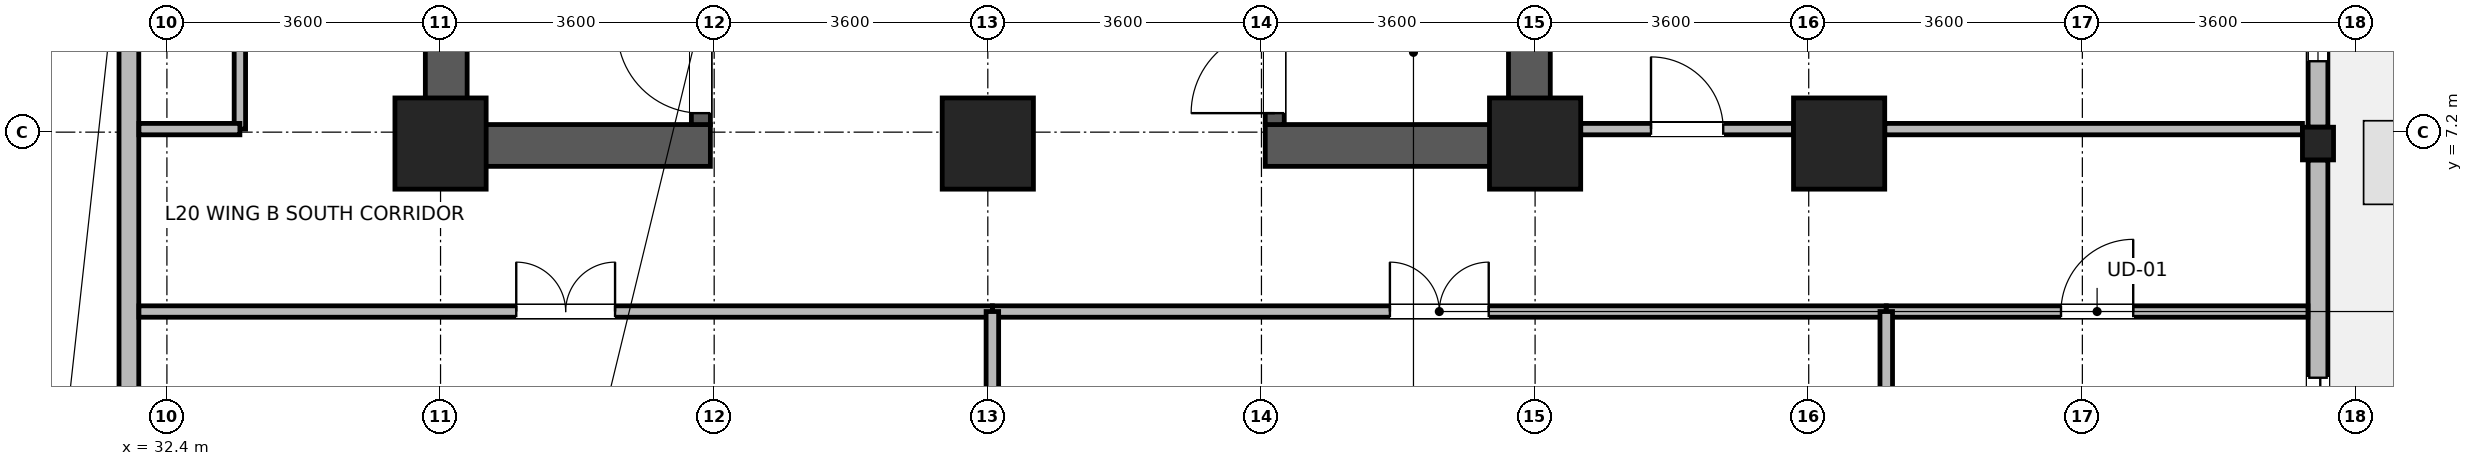
"""IFC4 building model, lengths in metres.
Left out: names, types, materials, properties, quantities, classifications, styles, units other than length and angle.
Written with IfcOpenShell. Run it as: python <this file> out.ifc"""

import sys

from ifc_helpers import new_model, si_unit, direction, frame, frame_2d, origin, origin_2d, place, context, subcontext, project, spatial, rectangle, i_section, extrude, source, transform, mapped, element, fill, save


model = new_model("IFC4")
c1 = context("Model", 3, precision=1e-05, world=origin(), true_north=direction((0.0, 1.0)))
c2 = subcontext(c1, "Body", "Model", "MODEL_VIEW")
j1 = project(units=[si_unit("LENGTHUNIT", "METRE"), si_unit("PLANEANGLEUNIT", "RADIAN")], contexts=[c1])
p1 = place(None, origin())
s1 = spatial("IfcSite", under=j1, at=p1, CompositionType="ELEMENT")
p2 = place(p1, origin())
s2 = spatial("IfcBuilding", under=s1, at=p2, CompositionType="ELEMENT")
p3 = place(p2, frame((0.0, 0.0, 82.3)))
s3 = spatial("IfcBuildingStorey", under=s2, at=p3, CompositionType="ELEMENT", Elevation=82.3)
for number, where, z_axis, x_axis in (
    (1, (36.075, 6.75, 0.0), (0.0, 0.0, 1.0), (0.0, 1.0, 0.0)),
    (2, (50.325, 6.75, 0.0), (0.0, 0.0, 1.0), (0.0, 1.0, 0.0)),
):
    element("IfcWall", number, at=place(p3, frame(where, z_axis=z_axis, x_axis=x_axis)), inside=s3, PredefinedType="SHEAR", context=c2, shape_type="SweptSolid", body=[
        extrude(rectangle(XDim=8.1, YDim=0.55, at=frame_2d((4.05, 0.0))), origin(), (0.0, 0.0, 1.0), 3.45),
    ])
for number, where, z_axis, x_axis in (
    (3, (36.35, 7.025, 0.0), (0.0, 0.0, 1.0), (1.0, 0.0, 0.0)),
    (4, (46.85, 7.025, 0.0), (0.0, 0.0, 1.0), (1.0, 0.0, 0.0)),
):
    element("IfcWall", number, at=place(p3, frame(where, z_axis=z_axis, x_axis=x_axis)), inside=s3, PredefinedType="SHEAR", context=c2, shape_type="SweptSolid", body=[
        extrude(rectangle(XDim=3.2, YDim=0.55, at=frame_2d((1.6, 0.0))), origin(), (0.0, 0.0, 1.0), 3.45),
    ])
p4 = place(p3, frame((39.425, 7.3, 0.0), z_axis=(0.0, 0.0, 1.0), x_axis=(0.0, 1.0, 0.0)))
e5 = element("IfcWall", 5, at=p4, inside=s3, PredefinedType="SHEAR", context=c2, shape_type="SweptSolid", body=[
    extrude(rectangle(XDim=7.0, YDim=0.25, at=frame_2d((3.5, 0.0))), origin(), (0.0, 0.0, 1.0), 3.45),
])
p5 = place(p4, frame((0.15, 0.0, 0.0)))
e6 = element("IfcOpeningElement", 6, at=p5, cuts=e5, PredefinedType="OPENING", context=c2, shape_type="SweptSolid", body=[
    extrude(rectangle(XDim=1.1, YDim=2.08, at=frame_2d((0.55, 1.04))), frame((0.0, 0.135, 0.0), z_axis=(0.0, -1.0, 0.0), x_axis=(1.0, 0.0, 0.0)), (0.0, 0.0, 1.0), 0.27),
])
p6 = place(p3, frame((46.975, 7.3, 0.0), z_axis=(0.0, 0.0, 1.0), x_axis=(0.0, 1.0, 0.0)))
e7 = element("IfcWall", 7, at=p6, inside=s3, PredefinedType="SHEAR", context=c2, shape_type="SweptSolid", body=[
    extrude(rectangle(XDim=7.0, YDim=0.25, at=frame_2d((3.5, 0.0))), origin(), (0.0, 0.0, 1.0), 3.45),
])
p7 = place(p6, frame((0.15, 0.0, 0.0)))
e8 = element("IfcOpeningElement", 8, at=p7, cuts=e7, PredefinedType="OPENING", context=c2, shape_type="SweptSolid", body=[
    extrude(rectangle(XDim=1.1, YDim=2.08, at=frame_2d((0.55, 1.04))), frame((0.0, 0.135, 0.0), z_axis=(0.0, -1.0, 0.0), x_axis=(1.0, 0.0, 0.0)), (0.0, 0.0, 1.0), 0.27),
])
m1 = source(origin(), c2, "Body", "SweptSolid", [
    extrude(rectangle(XDim=1.2, YDim=1.2, at=origin_2d()), origin(), (0.0, 0.0, 1.0), 3.7),
])
for number, where, z_axis, x_axis in (
    (9, (36.0, 7.05, 0.0), (0.0, 0.0, 1.0), (1.0, 0.0, 0.0)),
    (10, (43.2, 7.05, 0.0), (0.0, 0.0, 1.0), (1.0, 0.0, 0.0)),
    (11, (50.4, 7.05, 0.0), (0.0, 0.0, 1.0), (1.0, 0.0, 0.0)),
    (12, (54.4, 7.05, 0.0), (0.0, 0.0, 1.0), (1.0, 0.0, 0.0)),
):
    element("IfcColumn", number, at=place(p3, frame(where, z_axis=z_axis, x_axis=x_axis)), inside=s3, PredefinedType="COLUMN", context=c2, shape_type="MappedRepresentation", body=[
        mapped(m1, transform((0.0, 0.0, 0.0), x_axis=(1.0, 0.0, 0.0), y_axis=(0.0, 1.0, 0.0), z_axis=(0.0, 0.0, 1.0), scale=1.0)),
    ])
m2 = source(origin(), c2, "Body", "SweptSolid", [
    extrude(i_section(OverallWidth=0.409, OverallDepth=0.43, WebThickness=0.024, FlangeThickness=0.033, FilletRadius=0.015, at=origin_2d()), origin(), (0.0, 0.0, 1.0), 3.7),
])
p8 = place(p3, frame((60.7, 7.05, 0.0), z_axis=(0.0, 0.0, 1.0), x_axis=(1.0, 0.0, 0.0)))
e13 = element("IfcColumn", 13, at=p8, inside=s3, PredefinedType="COLUMN", context=c2, shape_type="MappedRepresentation", body=[
    mapped(m2, transform((0.0, 0.0, 0.0), x_axis=(1.0, 0.0, 0.0), y_axis=(0.0, 1.0, 0.0), z_axis=(0.0, 0.0, 1.0), scale=1.0)),
])
p9 = place(p3, frame((60.7, 6.834, 0.0), z_axis=(0.0, 0.0, 1.0), x_axis=(0.0, -1.0, 0.0)))
e14 = element("IfcWall", 14, at=p9, inside=s3, PredefinedType="STANDARD", context=c2, shape_type="SweptSolid", body=[
    extrude(rectangle(XDim=5.164, YDim=0.26, at=frame_2d((2.582, 0.0))), origin(), (0.0, 0.0, 1.0), 3.43),
])
p10 = place(p9, frame((2.865, 0.0, 0.0)))
e15 = element("IfcOpeningElement", 15, at=p10, cuts=e14, PredefinedType="OPENING", context=c2, shape_type="SweptSolid", body=[
    extrude(rectangle(XDim=1.5, YDim=2.15, at=frame_2d((0.75, 1.075))), frame((0.0, 0.14, 0.0), z_axis=(0.0, -1.0, 0.0), x_axis=(1.0, 0.0, 0.0)), (0.0, 0.0, 1.0), 0.28),
])
p11 = place(p3, frame((60.7, 14.334, 0.0), z_axis=(0.0, 0.0, 1.0), x_axis=(0.0, -1.0, 0.0)))
e16 = element("IfcWall", 16, at=p11, inside=s3, PredefinedType="STANDARD", context=c2, shape_type="SweptSolid", body=[
    extrude(rectangle(XDim=7.068, YDim=0.26, at=frame_2d((3.534, 0.0))), origin(), (0.0, 0.0, 1.0), 2.93),
])
p12 = place(p11, frame((0.867, 0.0, 0.85)))
e17 = element("IfcOpeningElement", 17, at=p12, cuts=e16, PredefinedType="OPENING", context=c2, shape_type="SweptSolid", body=[
    extrude(rectangle(XDim=1.8, YDim=1.85, at=frame_2d((0.9, 0.925))), frame((0.0, 0.14, 0.0), z_axis=(0.0, -1.0, 0.0), x_axis=(1.0, 0.0, 0.0)), (0.0, 0.0, 1.0), 0.28),
])
p13 = place(p11, frame((4.401, 0.0, 0.85)))
e18 = element("IfcOpeningElement", 18, at=p13, cuts=e16, PredefinedType="OPENING", context=c2, shape_type="SweptSolid", body=[
    extrude(rectangle(XDim=1.8, YDim=1.85, at=frame_2d((0.9, 0.925))), frame((0.0, 0.14, 0.0), z_axis=(0.0, -1.0, 0.0), x_axis=(1.0, 0.0, 0.0)), (0.0, 0.0, 1.0), 0.28),
])
p14 = place(p3, frame((31.9, 1.67, 0.0), z_axis=(0.0, 0.0, 1.0), x_axis=(0.0, 1.0, 0.0)))
e19 = element("IfcWall", 19, at=p14, inside=s3, PredefinedType="STANDARD", context=c2, shape_type="SweptSolid", body=[
    extrude(rectangle(XDim=20.06, YDim=0.26, at=frame_2d((10.03, 0.0))), origin(), (0.0, 0.0, 1.0), 3.43),
])
p15 = place(p14, frame((7.008, 0.0, 0.85)))
e20 = element("IfcOpeningElement", 20, at=p15, cuts=e19, PredefinedType="OPENING", context=c2, shape_type="SweptSolid", body=[
    extrude(rectangle(XDim=2.7, YDim=2.05, at=frame_2d((1.35, 1.025))), frame((0.0, 0.14, 0.0), z_axis=(0.0, -1.0, 0.0), x_axis=(1.0, 0.0, 0.0)), (0.0, 0.0, 1.0), 0.28),
])
p16 = place(p14, frame((13.695, 0.0, 0.85)))
e21 = element("IfcOpeningElement", 21, at=p16, cuts=e19, PredefinedType="OPENING", context=c2, shape_type="SweptSolid", body=[
    extrude(rectangle(XDim=2.7, YDim=2.05, at=frame_2d((1.35, 1.025))), frame((0.0, 0.14, 0.0), z_axis=(0.0, -1.0, 0.0), x_axis=(1.0, 0.0, 0.0)), (0.0, 0.0, 1.0), 0.28),
])
p17 = place(p3, frame((43.26, 4.84, 0.0), z_axis=(0.0, 0.0, 1.0), x_axis=(1.0, 0.0, 0.0)))
e22 = element("IfcWall", 22, at=p17, inside=s3, PredefinedType="PARTITIONING", context=c2, shape_type="SweptSolid", body=[
    extrude(rectangle(XDim=11.76, YDim=0.15, at=frame_2d((5.88, 0.0))), origin(), (0.0, 0.0, 1.0), 3.43),
])
p18 = place(p17, frame((5.23, 0.0, 0.0)))
e23 = element("IfcOpeningElement", 23, at=p18, cuts=e22, PredefinedType="OPENING", context=c2, shape_type="SweptSolid", body=[
    extrude(rectangle(XDim=1.3, YDim=2.12, at=frame_2d((0.65, 1.06))), frame((0.0, 0.085, 0.0), z_axis=(0.0, -1.0, 0.0), x_axis=(1.0, 0.0, 0.0)), (0.0, 0.0, 1.0), 0.17),
])
p19 = place(p3, frame((32.032, 4.84, 0.0), z_axis=(0.0, 0.0, 1.0), x_axis=(1.0, 0.0, 0.0)))
e24 = element("IfcWall", 24, at=p19, inside=s3, PredefinedType="PARTITIONING", context=c2, shape_type="SweptSolid", body=[
    extrude(rectangle(XDim=11.228, YDim=0.15, at=frame_2d((5.614, 0.0))), origin(), (0.0, 0.0, 1.0), 3.43),
])
p20 = place(p19, frame((4.964, 0.0, 0.0)))
e25 = element("IfcOpeningElement", 25, at=p20, cuts=e24, PredefinedType="OPENING", context=c2, shape_type="SweptSolid", body=[
    extrude(rectangle(XDim=1.3, YDim=2.12, at=frame_2d((0.65, 1.06))), frame((0.0, 0.085, 0.0), z_axis=(0.0, -1.0, 0.0), x_axis=(1.0, 0.0, 0.0)), (0.0, 0.0, 1.0), 0.17),
])
p21 = place(p3, frame((51.0, 7.24, 0.0), z_axis=(0.0, 0.0, 1.0), x_axis=(1.0, 0.0, 0.0)))
e26 = element("IfcWall", 26, at=p21, inside=s3, PredefinedType="PARTITIONING", context=c2, shape_type="SweptSolid", body=[
    extrude(rectangle(XDim=2.8, YDim=0.15, at=frame_2d((1.4, 0.0))), origin(), (0.0, 0.0, 1.0), 2.78),
])
p22 = place(p21, frame((0.925, 0.0, 0.0)))
e27 = element("IfcOpeningElement", 27, at=p22, cuts=e26, PredefinedType="OPENING", context=c2, shape_type="SweptSolid", body=[
    extrude(rectangle(XDim=0.95, YDim=2.1, at=frame_2d((0.475, 1.05))), frame((0.0, 0.085, 0.0), z_axis=(0.0, -1.0, 0.0), x_axis=(1.0, 0.0, 0.0)), (0.0, 0.0, 1.0), 0.17),
])
p23 = place(p3, frame((55.0, 7.24, 0.0), z_axis=(0.0, 0.0, 1.0), x_axis=(1.0, 0.0, 0.0)))
e28 = element("IfcWall", 28, at=p23, inside=s3, PredefinedType="PARTITIONING", context=c2, shape_type="SweptSolid", body=[
    extrude(rectangle(XDim=5.496, YDim=0.15, at=frame_2d((2.748, 0.0))), origin(), (0.0, 0.0, 1.0), 2.78),
])
p24 = place(p3, frame((33.36, 7.24, 0.0), z_axis=(0.0, 0.0, 1.0), x_axis=(0.0, 1.0, 0.0)))
e29 = element("IfcWall", 29, at=p24, inside=s3, PredefinedType="PARTITIONING", context=c2, shape_type="SweptSolid", body=[
    extrude(rectangle(XDim=7.26, YDim=0.15, at=frame_2d((3.63, 0.0))), origin(), (0.0, 0.0, 1.0), 3.43),
])
p25 = place(p24, frame((2.98, 0.0, 0.0)))
e30 = element("IfcOpeningElement", 30, at=p25, cuts=e29, PredefinedType="OPENING", context=c2, shape_type="SweptSolid", body=[
    extrude(rectangle(XDim=1.3, YDim=2.12, at=frame_2d((0.65, 1.06))), frame((0.0, 0.085, 0.0), z_axis=(0.0, -1.0, 0.0), x_axis=(1.0, 0.0, 0.0)), (0.0, 0.0, 1.0), 0.17),
])
p26 = place(p3, frame((55.02, 4.84, 0.0), z_axis=(0.0, 0.0, 1.0), x_axis=(1.0, 0.0, 0.0)))
e31 = element("IfcWall", 31, at=p26, inside=s3, PredefinedType="PARTITIONING", context=c2, shape_type="SweptSolid", body=[
    extrude(rectangle(XDim=5.548, YDim=0.15, at=frame_2d((2.774, 0.0))), origin(), (0.0, 0.0, 1.0), 3.43),
])
p27 = place(p26, frame((2.299, 0.0, 0.0)))
e32 = element("IfcOpeningElement", 32, at=p27, cuts=e31, PredefinedType="OPENING", context=c2, shape_type="SweptSolid", body=[
    extrude(rectangle(XDim=0.95, YDim=2.1, at=frame_2d((0.475, 1.05))), frame((0.0, 0.085, 0.0), z_axis=(0.0, -1.0, 0.0), x_axis=(1.0, 0.0, 0.0)), (0.0, 0.0, 1.0), 0.17),
])
p28 = place(p3, frame((32.032, 7.24, 0.0), z_axis=(0.0, 0.0, 1.0), x_axis=(1.0, 0.0, 0.0)))
e33 = element("IfcWall", 33, at=p28, inside=s3, PredefinedType="PARTITIONING", context=c2, shape_type="SweptSolid", body=[
    extrude(rectangle(XDim=1.328, YDim=0.15, at=frame_2d((0.664, 0.0))), origin(), (0.0, 0.0, 1.0), 3.43),
])
for number, where, z_axis, x_axis in (
    (34, (43.26, 1.932, 0.0), (0.0, 0.0, 1.0), (0.0, 1.0, 0.0)),
    (35, (55.02, 1.932, 0.0), (0.0, 0.0, 1.0), (0.0, 1.0, 0.0)),
):
    element("IfcWall", number, at=place(p3, frame(where, z_axis=z_axis, x_axis=x_axis)), inside=s3, PredefinedType="PARTITIONING", context=c2, shape_type="SweptSolid", body=[
        extrude(rectangle(XDim=2.908, YDim=0.165, at=frame_2d((1.454, 0.0))), origin(), (0.0, 0.0, 1.0), 3.43),
    ])
p29 = place(p10, origin())
e36 = element("IfcDoor", 36, at=p29, inside=s3, OperationType="SLIDING_TO_LEFT", PredefinedType="DOOR", context=c2, shape_type="SweptSolid", body=[
    extrude(rectangle(XDim=1.5, YDim=2.15, at=frame_2d((0.75, 1.075))), frame((0.0, 0.025, 0.0), z_axis=(0.0, -1.0, 0.0), x_axis=(1.0, 0.0, 0.0)), (0.0, 0.0, 1.0), 0.05),
])
fill(e15, e36)
p30 = place(p13, origin())
e37 = element("IfcWindow", 37, at=p30, inside=s3, PartitioningType="SINGLE_PANEL", PredefinedType="WINDOW", context=c2, shape_type="SweptSolid", body=[
    extrude(rectangle(XDim=1.8, YDim=1.85, at=frame_2d((0.9, 0.925))), frame((0.0, 0.03, 0.0), z_axis=(0.0, -1.0, 0.0), x_axis=(1.0, 0.0, 0.0)), (0.0, 0.0, 1.0), 0.06),
])
fill(e18, e37)
p31 = place(p5, origin())
e38 = element("IfcDoor", 38, at=p31, inside=s3, OperationType="SINGLE_SWING_RIGHT", PredefinedType="DOOR", context=c2, shape_type="SweptSolid", body=[
    extrude(rectangle(XDim=1.1, YDim=2.08, at=frame_2d((0.55, 1.04))), frame((0.0, 0.025, 0.0), z_axis=(0.0, -1.0, 0.0), x_axis=(1.0, 0.0, 0.0)), (0.0, 0.0, 1.0), 0.05),
])
fill(e6, e38)
p32 = place(p7, origin())
e39 = element("IfcDoor", 39, at=p32, inside=s3, OperationType="SINGLE_SWING_LEFT", PredefinedType="DOOR", context=c2, shape_type="SweptSolid", body=[
    extrude(rectangle(XDim=1.1, YDim=2.08, at=frame_2d((0.55, 1.04))), frame((0.0, 0.025, 0.0), z_axis=(0.0, -1.0, 0.0), x_axis=(1.0, 0.0, 0.0)), (0.0, 0.0, 1.0), 0.05),
])
fill(e8, e39)
p33 = place(p18, origin())
e40 = element("IfcDoor", 40, at=p33, inside=s3, OperationType="DOUBLE_DOOR_SINGLE_SWING", PredefinedType="DOOR", context=c2, shape_type="SweptSolid", body=[
    extrude(rectangle(XDim=1.3, YDim=2.12, at=frame_2d((0.65, 1.06))), frame((0.0, 0.025, 0.0), z_axis=(0.0, -1.0, 0.0), x_axis=(1.0, 0.0, 0.0)), (0.0, 0.0, 1.0), 0.05),
])
fill(e23, e40)
p34 = place(p20, origin())
e41 = element("IfcDoor", 41, at=p34, inside=s3, OperationType="DOUBLE_DOOR_SINGLE_SWING", PredefinedType="DOOR", context=c2, shape_type="SweptSolid", body=[
    extrude(rectangle(XDim=1.3, YDim=2.12, at=frame_2d((0.65, 1.06))), frame((0.0, 0.025, 0.0), z_axis=(0.0, -1.0, 0.0), x_axis=(1.0, 0.0, 0.0)), (0.0, 0.0, 1.0), 0.05),
])
fill(e25, e41)
p35 = place(p22, origin())
e42 = element("IfcDoor", 42, at=p35, inside=s3, OperationType="SINGLE_SWING_LEFT", PredefinedType="DOOR", context=c2, shape_type="SweptSolid", body=[
    extrude(rectangle(XDim=0.95, YDim=2.1, at=frame_2d((0.475, 1.05))), frame((0.0, 0.025, 0.0), z_axis=(0.0, -1.0, 0.0), x_axis=(1.0, 0.0, 0.0)), (0.0, 0.0, 1.0), 0.05),
])
fill(e27, e42)
p36 = place(p27, origin())
e43 = element("IfcDoor", 43, at=p36, inside=s3, OperationType="SINGLE_SWING_RIGHT", PredefinedType="DOOR", context=c2, shape_type="SweptSolid", body=[
    extrude(rectangle(XDim=0.95, YDim=2.1, at=frame_2d((0.475, 1.05))), frame((0.0, 0.025, 0.0), z_axis=(0.0, -1.0, 0.0), x_axis=(1.0, 0.0, 0.0)), (0.0, 0.0, 1.0), 0.05),
])
fill(e32, e43)
save(model, sys.argv[1])
